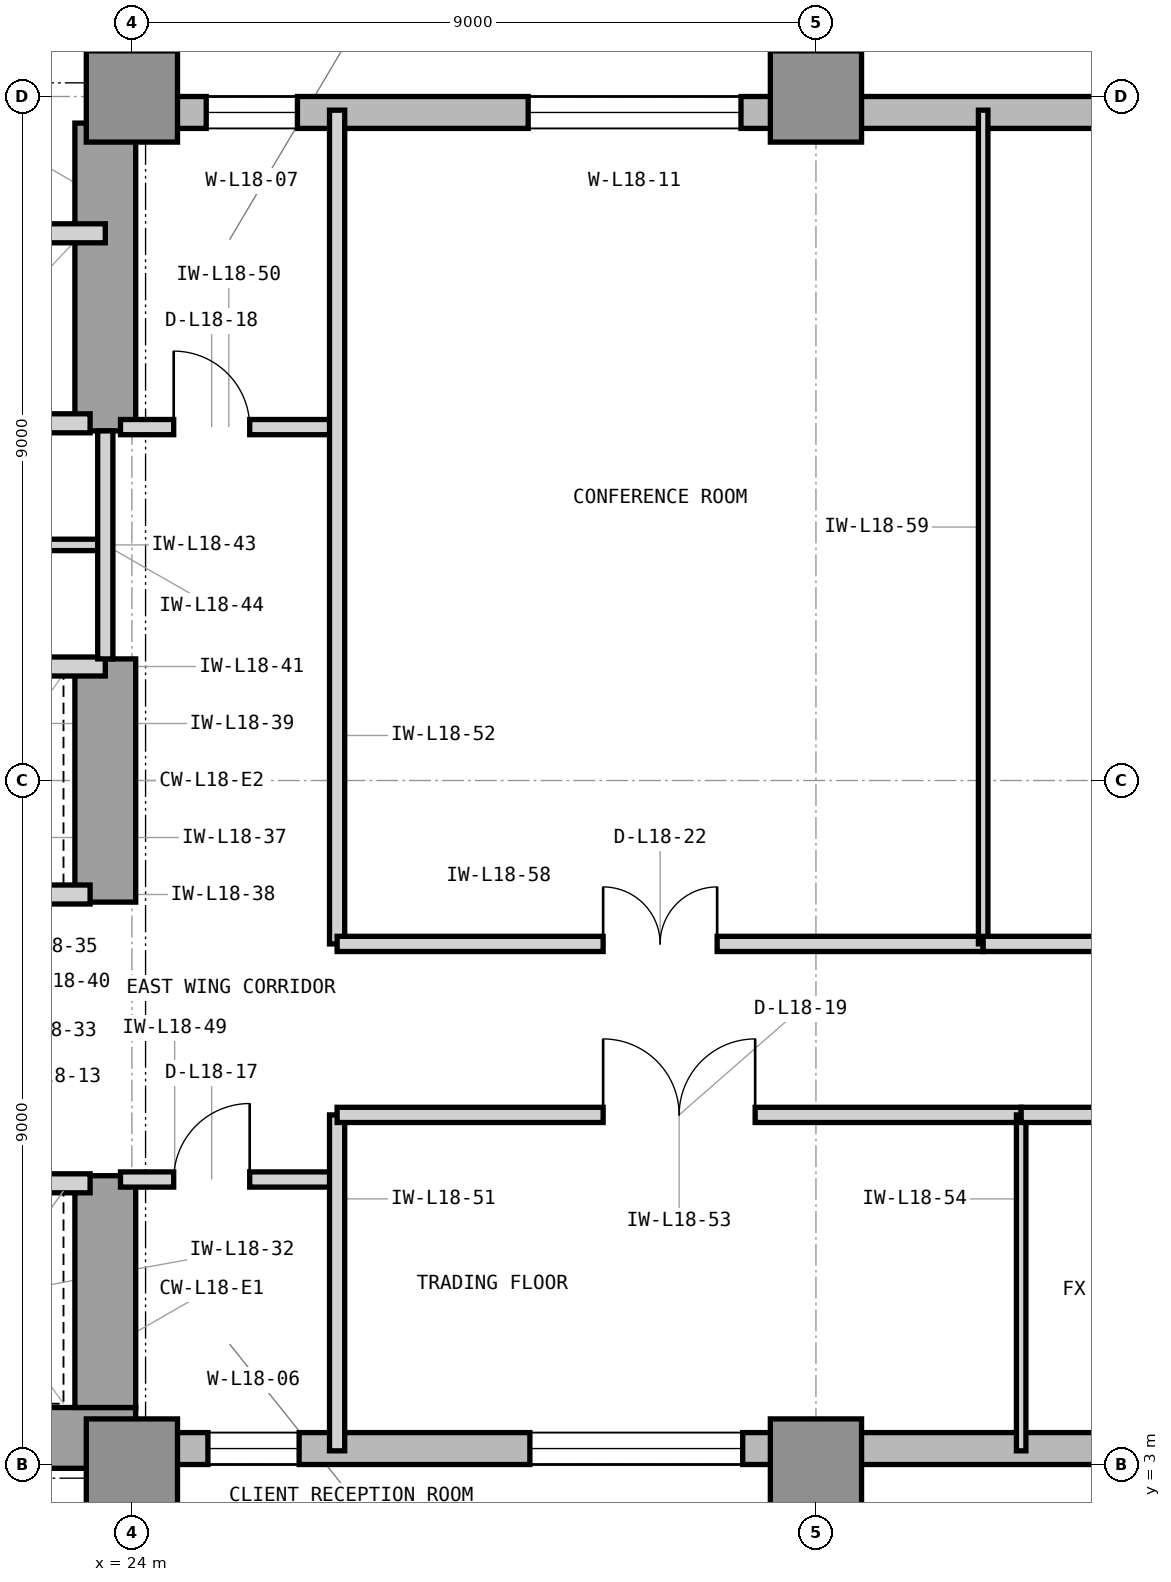
"""IFC4 building model, lengths in metres.
Left out: names, types, materials, properties, quantities, classifications, styles, units other than length and angle.
Written with IfcOpenShell. Run it as: python <this file> out.ifc"""

import sys

from ifc_helpers import new_model, si_unit, direction, frame, frame_2d, origin, origin_2d, place, context, subcontext, project, spatial, rectangle, extrude, element, fill, save


model = new_model("IFC4")
c1 = context("Model", 3, precision=1e-05, world=origin(), true_north=direction((0.0, 1.0)))
c2 = subcontext(c1, "Body", "Model", "MODEL_VIEW")
j1 = project(units=[si_unit("LENGTHUNIT", "METRE"), si_unit("PLANEANGLEUNIT", "RADIAN")], contexts=[c1])
p1 = place(None, origin())
s1 = spatial("IfcSite", under=j1, at=p1, CompositionType="ELEMENT")
p2 = place(p1, origin())
s2 = spatial("IfcBuilding", under=s1, at=p2, CompositionType="ELEMENT")
p3 = place(p2, frame((0.0, 0.0, 80.4)))
s3 = spatial("IfcBuildingStorey", under=s2, at=p3, CompositionType="ELEMENT", Elevation=80.4)
p4 = place(p3, frame((7.475, 3.35, 0.0), z_axis=(0.0, 0.0, 1.0), x_axis=(1.0, 0.0, 0.0)))
e1 = element("IfcWall", 1, at=p4, inside=s3, PredefinedType="SHEAR", context=c2, shape_type="SweptSolid", body=[
    extrude(rectangle(XDim=16.575, YDim=0.8, at=frame_2d((8.288, 0.0))), origin(), (0.0, 0.0, 1.0), 4.2),
])
p5 = place(p3, frame((23.65, 3.75, 0.0), z_axis=(0.0, 0.0, 1.0), x_axis=(0.0, 1.0, 0.0)))
e2 = element("IfcWall", 2, at=p5, inside=s3, PredefinedType="SHEAR", context=c2, shape_type="SweptSolid", body=[
    extrude(rectangle(XDim=3.05, YDim=0.8, at=frame_2d((1.525, 0.0))), origin(), (0.0, 0.0, 1.0), 4.2),
])
p6 = place(p3, frame((23.65, 10.4, 0.0), z_axis=(0.0, 0.0, 1.0), x_axis=(0.0, 1.0, 0.0)))
e3 = element("IfcWall", 3, at=p6, inside=s3, PredefinedType="SHEAR", context=c2, shape_type="SweptSolid", body=[
    extrude(rectangle(XDim=3.2, YDim=0.8, at=frame_2d((1.6, 0.0))), origin(), (0.0, 0.0, 1.0), 4.2),
])
p7 = place(p3, frame((23.65, 16.6, 0.0), z_axis=(0.0, 0.0, 1.0), x_axis=(0.0, 1.0, 0.0)))
e4 = element("IfcWall", 4, at=p7, inside=s3, PredefinedType="SHEAR", context=c2, shape_type="SweptSolid", body=[
    extrude(rectangle(XDim=4.05, YDim=0.8, at=frame_2d((2.025, 0.0))), origin(), (0.0, 0.0, 1.0), 4.2),
])
for number, where, z_axis, x_axis in (
    (5, (24.0, 3.0, 0.0), (0.0, 0.0, 1.0), (1.0, 0.0, 0.0)),
    (6, (24.0, 21.0, 0.0), (0.0, 0.0, 1.0), (1.0, 0.0, 0.0)),
    (7, (33.0, 3.0, 0.0), (0.0, 0.0, 1.0), (1.0, 0.0, 0.0)),
    (8, (33.0, 21.0, 0.0), (0.0, 0.0, 1.0), (1.0, 0.0, 0.0)),
):
    element("IfcColumn", number, at=place(p3, frame(where, z_axis=z_axis, x_axis=x_axis)), inside=s3, PredefinedType="COLUMN", context=c2, shape_type="SweptSolid", body=[
        extrude(rectangle(XDim=1.2, YDim=1.2, at=origin_2d()), origin(), (0.0, 0.0, 1.0), 4.2),
    ])
p8 = place(p3, frame((23.9, 3.21, 0.0), z_axis=(0.0, 0.0, 1.0), x_axis=(1.0, 0.0, 0.0)))
e9 = element("IfcWall", 9, at=p8, inside=s3, PredefinedType="STANDARD", context=c2, shape_type="SweptSolid", body=[
    extrude(rectangle(XDim=40.5, YDim=0.42, at=frame_2d((20.25, 0.0))), origin(), (0.0, 0.0, 1.0), 3.92),
])
p9 = place(p8, frame((1.1, 0.0, 0.85)))
e10 = element("IfcOpeningElement", 10, at=p9, cuts=e9, PredefinedType="OPENING", context=c2, shape_type="SweptSolid", body=[
    extrude(rectangle(XDim=1.2, YDim=2.45, at=frame_2d((0.6, 1.225))), frame((0.0, 0.22, 0.0), z_axis=(0.0, -1.0, 0.0), x_axis=(1.0, 0.0, 0.0)), (0.0, 0.0, 1.0), 0.44),
])
p10 = place(p8, frame((5.336, 0.0, 0.85)))
e11 = element("IfcOpeningElement", 11, at=p10, cuts=e9, PredefinedType="OPENING", context=c2, shape_type="SweptSolid", body=[
    extrude(rectangle(XDim=2.8, YDim=2.45, at=frame_2d((1.4, 1.225))), frame((0.0, 0.22, 0.0), z_axis=(0.0, -1.0, 0.0), x_axis=(1.0, 0.0, 0.0)), (0.0, 0.0, 1.0), 0.44),
])
p11 = place(p8, frame((14.136, 0.0, 0.85)))
e12 = element("IfcOpeningElement", 12, at=p11, cuts=e9, PredefinedType="OPENING", context=c2, shape_type="SweptSolid", body=[
    extrude(rectangle(XDim=2.8, YDim=2.45, at=frame_2d((1.4, 1.225))), frame((0.0, 0.22, 0.0), z_axis=(0.0, -1.0, 0.0), x_axis=(1.0, 0.0, 0.0)), (0.0, 0.0, 1.0), 0.44),
])
p12 = place(p8, frame((20.336, 0.0, 0.85)))
e13 = element("IfcOpeningElement", 13, at=p12, cuts=e9, PredefinedType="OPENING", context=c2, shape_type="SweptSolid", body=[
    extrude(rectangle(XDim=2.8, YDim=2.45, at=frame_2d((1.4, 1.225))), frame((0.0, 0.22, 0.0), z_axis=(0.0, -1.0, 0.0), x_axis=(1.0, 0.0, 0.0)), (0.0, 0.0, 1.0), 0.44),
])
p13 = place(p3, frame((64.4, 20.79, 0.0), z_axis=(0.0, 0.0, 1.0), x_axis=(-1.0, 0.0, 0.0)))
e14 = element("IfcWall", 14, at=p13, inside=s3, PredefinedType="STANDARD", context=c2, shape_type="SweptSolid", body=[
    extrude(rectangle(XDim=40.4, YDim=0.42, at=frame_2d((20.2, 0.0))), origin(), (0.0, 0.0, 1.0), 3.92),
])
p14 = place(p13, frame((38.222, 0.0, 0.85)))
e15 = element("IfcOpeningElement", 15, at=p14, cuts=e14, PredefinedType="OPENING", context=c2, shape_type="SweptSolid", body=[
    extrude(rectangle(XDim=1.2, YDim=2.45, at=frame_2d((0.6, 1.225))), frame((0.0, 0.22, 0.0), z_axis=(0.0, -1.0, 0.0), x_axis=(1.0, 0.0, 0.0)), (0.0, 0.0, 1.0), 0.44),
])
p15 = place(p13, frame((32.386, 0.0, 0.85)))
e16 = element("IfcOpeningElement", 16, at=p15, cuts=e14, PredefinedType="OPENING", context=c2, shape_type="SweptSolid", body=[
    extrude(rectangle(XDim=2.8, YDim=2.45, at=frame_2d((1.4, 1.225))), frame((0.0, 0.22, 0.0), z_axis=(0.0, -1.0, 0.0), x_axis=(1.0, 0.0, 0.0)), (0.0, 0.0, 1.0), 0.44),
])
p16 = place(p13, frame((23.386, 0.0, 0.85)))
e17 = element("IfcOpeningElement", 17, at=p16, cuts=e14, PredefinedType="OPENING", context=c2, shape_type="SweptSolid", body=[
    extrude(rectangle(XDim=2.8, YDim=2.45, at=frame_2d((1.4, 1.225))), frame((0.0, 0.22, 0.0), z_axis=(0.0, -1.0, 0.0), x_axis=(1.0, 0.0, 0.0)), (0.0, 0.0, 1.0), 0.44),
])
p17 = place(p13, frame((17.386, 0.0, 0.85)))
e18 = element("IfcOpeningElement", 18, at=p17, cuts=e14, PredefinedType="OPENING", context=c2, shape_type="SweptSolid", body=[
    extrude(rectangle(XDim=2.1, YDim=2.45, at=frame_2d((1.05, 1.225))), frame((0.0, 0.22, 0.0), z_axis=(0.0, -1.0, 0.0), x_axis=(1.0, 0.0, 0.0)), (0.0, 0.0, 1.0), 0.44),
])
p18 = place(p13, frame((8.436, 0.0, 0.85)))
e19 = element("IfcOpeningElement", 19, at=p18, cuts=e14, PredefinedType="OPENING", context=c2, shape_type="SweptSolid", body=[
    extrude(rectangle(XDim=1.2, YDim=2.45, at=frame_2d((0.6, 1.225))), frame((0.0, 0.22, 0.0), z_axis=(0.0, -1.0, 0.0), x_axis=(1.0, 0.0, 0.0)), (0.0, 0.0, 1.0), 0.44),
])
p19 = place(p3, frame((23.79, 21.0, 0.0), z_axis=(0.0, 0.0, 1.0), x_axis=(0.0, 1.0, 0.0)))
e20 = element("IfcWall", 20, at=p19, inside=s3, PredefinedType="STANDARD", context=c2, shape_type="SweptSolid", body=[
    extrude(rectangle(XDim=28.4, YDim=0.42, at=frame_2d((14.2, 0.0))), origin(), (0.0, 0.0, 1.0), 3.92),
])
p20 = place(p19, frame((10.433, 0.0, 0.85)))
e21 = element("IfcOpeningElement", 21, at=p20, cuts=e20, PredefinedType="OPENING", context=c2, shape_type="SweptSolid", body=[
    extrude(rectangle(XDim=2.8, YDim=2.45, at=frame_2d((1.4, 1.225))), frame((0.0, 0.22, 0.0), z_axis=(0.0, -1.0, 0.0), x_axis=(1.0, 0.0, 0.0)), (0.0, 0.0, 1.0), 0.44),
])
p21 = place(p19, frame((21.966, 0.0, 0.85)))
e22 = element("IfcOpeningElement", 22, at=p21, cuts=e20, PredefinedType="OPENING", context=c2, shape_type="SweptSolid", body=[
    extrude(rectangle(XDim=1.2, YDim=2.45, at=frame_2d((0.6, 1.225))), frame((0.0, 0.22, 0.0), z_axis=(0.0, -1.0, 0.0), x_axis=(1.0, 0.0, 0.0)), (0.0, 0.0, 1.0), 0.44),
])
p22 = place(p3, frame((21.05, 16.7, 0.0), z_axis=(0.0, 0.0, 1.0), x_axis=(1.0, 0.0, 0.0)))
e23 = element("IfcWall", 23, at=p22, inside=s3, PredefinedType="PARTITIONING", context=c2, shape_type="SweptSolid", body=[
    extrude(rectangle(XDim=2.4, YDim=0.25, at=frame_2d((1.2, 0.0))), origin(), (0.0, 0.0, 1.0), 3.293),
])
p23 = place(p3, frame((16.45, 19.2, 0.0), z_axis=(0.0, 0.0, 1.0), x_axis=(1.0, 0.0, 0.0)))
e24 = element("IfcWall", 24, at=p23, inside=s3, PredefinedType="PARTITIONING", context=c2, shape_type="SweptSolid", body=[
    extrude(rectangle(XDim=7.2, YDim=0.25, at=frame_2d((3.6, 0.0))), origin(), (0.0, 0.0, 1.0), 3.91),
])
p24 = place(p3, frame((21.05, 6.7, 0.0), z_axis=(0.0, 0.0, 1.0), x_axis=(1.0, 0.0, 0.0)))
e25 = element("IfcWall", 25, at=p24, inside=s3, PredefinedType="PARTITIONING", context=c2, shape_type="SweptSolid", body=[
    extrude(rectangle(XDim=2.4, YDim=0.25, at=frame_2d((1.2, 0.0))), origin(), (0.0, 0.0, 1.0), 3.293),
])
p25 = place(p24, frame((0.48, 0.0, 0.0)))
e26 = element("IfcOpeningElement", 26, at=p25, cuts=e25, PredefinedType="OPENING", context=c2, shape_type="SweptSolid", body=[
    extrude(rectangle(XDim=1.15, YDim=2.25, at=frame_2d((0.575, 1.125))), frame((0.0, 0.135, 0.0), z_axis=(0.0, -1.0, 0.0), x_axis=(1.0, 0.0, 0.0)), (0.0, 0.0, 1.0), 0.27),
])
p26 = place(p3, frame((21.05, 10.5, 0.0), z_axis=(0.0, 0.0, 1.0), x_axis=(1.0, 0.0, 0.0)))
e27 = element("IfcWall", 27, at=p26, inside=s3, PredefinedType="PARTITIONING", context=c2, shape_type="SweptSolid", body=[
    extrude(rectangle(XDim=2.4, YDim=0.25, at=frame_2d((1.2, 0.0))), origin(), (0.0, 0.0, 1.0), 3.293),
])
p27 = place(p3, frame((14.7, 13.5, 0.0), z_axis=(0.0, 0.0, 1.0), x_axis=(1.0, 0.0, 0.0)))
e28 = element("IfcWall", 28, at=p27, inside=s3, PredefinedType="PARTITIONING", context=c2, shape_type="SweptSolid", body=[
    extrude(rectangle(XDim=8.95, YDim=0.25, at=frame_2d((4.475, 0.0))), origin(), (0.0, 0.0, 1.0), 3.293),
])
p28 = place(p3, frame((18.45, 15.1, 0.0), z_axis=(0.0, 0.0, 1.0), x_axis=(1.0, 0.0, 0.0)))
e29 = element("IfcWall", 29, at=p28, inside=s3, PredefinedType="PARTITIONING", context=c2, shape_type="SweptSolid", body=[
    extrude(rectangle(XDim=5.2, YDim=0.15, at=frame_2d((2.6, 0.0))), origin(), (0.0, 0.0, 1.0), 3.91),
])
p29 = place(p3, frame((23.65, 13.6, 0.0), z_axis=(0.0, 0.0, 1.0), x_axis=(0.0, 1.0, 0.0)))
e30 = element("IfcWall", 30, at=p29, inside=s3, PredefinedType="PARTITIONING", context=c2, shape_type="SweptSolid", body=[
    extrude(rectangle(XDim=3.0, YDim=0.2, at=frame_2d((1.5, 0.0))), origin(), (0.0, 0.0, 1.0), 3.91),
])
p30 = place(p3, frame((23.85, 6.75, 0.0), z_axis=(0.0, 0.0, 1.0), x_axis=(1.0, 0.0, 0.0)))
e31 = element("IfcWall", 31, at=p30, inside=s3, PredefinedType="PARTITIONING", context=c2, shape_type="SweptSolid", body=[
    extrude(rectangle(XDim=2.85, YDim=0.2, at=frame_2d((1.425, 0.0))), origin(), (0.0, 0.0, 1.0), 3.91),
])
p31 = place(p30, frame((0.7, 0.0, 0.0)))
e32 = element("IfcOpeningElement", 32, at=p31, cuts=e31, PredefinedType="OPENING", context=c2, shape_type="SweptSolid", body=[
    extrude(rectangle(XDim=1.0, YDim=2.15, at=frame_2d((0.5, 1.075))), frame((0.0, 0.11, 0.0), z_axis=(0.0, -1.0, 0.0), x_axis=(1.0, 0.0, 0.0)), (0.0, 0.0, 1.0), 0.22),
])
p32 = place(p3, frame((23.85, 16.65, 0.0), z_axis=(0.0, 0.0, 1.0), x_axis=(1.0, 0.0, 0.0)))
e33 = element("IfcWall", 33, at=p32, inside=s3, PredefinedType="PARTITIONING", context=c2, shape_type="SweptSolid", body=[
    extrude(rectangle(XDim=2.85, YDim=0.2, at=frame_2d((1.425, 0.0))), origin(), (0.0, 0.0, 1.0), 3.91),
])
p33 = place(p32, frame((0.7, 0.0, 0.0)))
e34 = element("IfcOpeningElement", 34, at=p33, cuts=e33, PredefinedType="OPENING", context=c2, shape_type="SweptSolid", body=[
    extrude(rectangle(XDim=1.0, YDim=2.15, at=frame_2d((0.5, 1.075))), frame((0.0, 0.11, 0.0), z_axis=(0.0, -1.0, 0.0), x_axis=(1.0, 0.0, 0.0)), (0.0, 0.0, 1.0), 0.22),
])
p34 = place(p3, frame((26.7, 3.18, 0.0), z_axis=(0.0, 0.0, 1.0), x_axis=(0.0, 1.0, 0.0)))
e35 = element("IfcWall", 35, at=p34, inside=s3, PredefinedType="PARTITIONING", context=c2, shape_type="SweptSolid", body=[
    extrude(rectangle(XDim=4.42, YDim=0.2, at=frame_2d((2.21, 0.0))), origin(), (0.0, 0.0, 1.0), 3.91),
])
p35 = place(p3, frame((26.7, 9.85, 0.0), z_axis=(0.0, 0.0, 1.0), x_axis=(0.0, 1.0, 0.0)))
e36 = element("IfcWall", 36, at=p35, inside=s3, PredefinedType="PARTITIONING", context=c2, shape_type="SweptSolid", body=[
    extrude(rectangle(XDim=10.97, YDim=0.2, at=frame_2d((5.485, 0.0))), origin(), (0.0, 0.0, 1.0), 3.91),
])
p36 = place(p3, frame((26.7, 7.6, 0.0), z_axis=(0.0, 0.0, 1.0), x_axis=(1.0, 0.0, 0.0)))
e37 = element("IfcWall", 37, at=p36, inside=s3, PredefinedType="PARTITIONING", context=c2, shape_type="SweptSolid", body=[
    extrude(rectangle(XDim=9.0, YDim=0.2, at=frame_2d((4.5, 0.0))), origin(), (0.0, 0.0, 1.0), 3.91),
])
p37 = place(p36, frame((3.5, 0.0, 0.0)))
e38 = element("IfcOpeningElement", 38, at=p37, cuts=e37, PredefinedType="OPENING", context=c2, shape_type="SweptSolid", body=[
    extrude(rectangle(XDim=2.0, YDim=2.5, at=frame_2d((1.0, 1.25))), frame((0.0, 0.11, 0.0), z_axis=(0.0, -1.0, 0.0), x_axis=(1.0, 0.0, 0.0)), (0.0, 0.0, 1.0), 0.22),
])
p38 = place(p3, frame((35.7, 3.18, 0.0), z_axis=(0.0, 0.0, 1.0), x_axis=(0.0, 1.0, 0.0)))
e39 = element("IfcWall", 39, at=p38, inside=s3, PredefinedType="PARTITIONING", context=c2, shape_type="SweptSolid", body=[
    extrude(rectangle(XDim=4.42, YDim=0.125, at=frame_2d((2.21, 0.0))), origin(), (0.0, 0.0, 1.0), 3.91),
])
p39 = place(p3, frame((35.7, 7.6, 0.0), z_axis=(0.0, 0.0, 1.0), x_axis=(1.0, 0.0, 0.0)))
e40 = element("IfcWall", 40, at=p39, inside=s3, PredefinedType="PARTITIONING", context=c2, shape_type="SweptSolid", body=[
    extrude(rectangle(XDim=7.5, YDim=0.2, at=frame_2d((3.75, 0.0))), origin(), (0.0, 0.0, 1.0), 3.91),
])
p40 = place(p39, frame((3.25, 0.0, 0.0)))
e41 = element("IfcOpeningElement", 41, at=p40, cuts=e40, PredefinedType="OPENING", context=c2, shape_type="SweptSolid", body=[
    extrude(rectangle(XDim=1.0, YDim=2.15, at=frame_2d((0.5, 1.075))), frame((0.0, 0.11, 0.0), z_axis=(0.0, -1.0, 0.0), x_axis=(1.0, 0.0, 0.0)), (0.0, 0.0, 1.0), 0.22),
])
p41 = place(p3, frame((26.7, 9.85, 0.0), z_axis=(0.0, 0.0, 1.0), x_axis=(1.0, 0.0, 0.0)))
e42 = element("IfcWall", 42, at=p41, inside=s3, PredefinedType="PARTITIONING", context=c2, shape_type="SweptSolid", body=[
    extrude(rectangle(XDim=8.5, YDim=0.2, at=frame_2d((4.25, 0.0))), origin(), (0.0, 0.0, 1.0), 3.91),
])
p42 = place(p41, frame((3.5, 0.0, 0.0)))
e43 = element("IfcOpeningElement", 43, at=p42, cuts=e42, PredefinedType="OPENING", context=c2, shape_type="SweptSolid", body=[
    extrude(rectangle(XDim=1.5, YDim=2.3, at=frame_2d((0.75, 1.15))), frame((0.0, 0.11, 0.0), z_axis=(0.0, -1.0, 0.0), x_axis=(1.0, 0.0, 0.0)), (0.0, 0.0, 1.0), 0.22),
])
p43 = place(p3, frame((35.2, 9.85, 0.0), z_axis=(0.0, 0.0, 1.0), x_axis=(0.0, 1.0, 0.0)))
e44 = element("IfcWall", 44, at=p43, inside=s3, PredefinedType="PARTITIONING", context=c2, shape_type="SweptSolid", body=[
    extrude(rectangle(XDim=10.97, YDim=0.125, at=frame_2d((5.485, 0.0))), origin(), (0.0, 0.0, 1.0), 3.91),
])
p44 = place(p3, frame((35.2, 9.85, 0.0), z_axis=(0.0, 0.0, 1.0), x_axis=(1.0, 0.0, 0.0)))
e45 = element("IfcWall", 45, at=p44, inside=s3, PredefinedType="PARTITIONING", context=c2, shape_type="SweptSolid", body=[
    extrude(rectangle(XDim=9.0, YDim=0.2, at=frame_2d((4.5, 0.0))), origin(), (0.0, 0.0, 1.0), 3.91),
])
p45 = place(p44, frame((4.0, 0.0, 0.0)))
e46 = element("IfcOpeningElement", 46, at=p45, cuts=e45, PredefinedType="OPENING", context=c2, shape_type="SweptSolid", body=[
    extrude(rectangle(XDim=1.0, YDim=2.15, at=frame_2d((0.5, 1.075))), frame((0.0, 0.11, 0.0), z_axis=(0.0, -1.0, 0.0), x_axis=(1.0, 0.0, 0.0)), (0.0, 0.0, 1.0), 0.22),
])
p46 = place(p31, origin())
e47 = element("IfcDoor", 47, at=p46, inside=s3, OperationType="SINGLE_SWING_RIGHT", PredefinedType="DOOR", context=c2, shape_type="SweptSolid", body=[
    extrude(rectangle(XDim=1.0, YDim=2.15, at=frame_2d((0.5, 1.075))), frame((0.0, 0.025, 0.0), z_axis=(0.0, -1.0, 0.0), x_axis=(1.0, 0.0, 0.0)), (0.0, 0.0, 1.0), 0.05),
])
fill(e32, e47)
p47 = place(p33, origin())
e48 = element("IfcDoor", 48, at=p47, inside=s3, OperationType="SINGLE_SWING_LEFT", PredefinedType="DOOR", context=c2, shape_type="SweptSolid", body=[
    extrude(rectangle(XDim=1.0, YDim=2.15, at=frame_2d((0.5, 1.075))), frame((0.0, 0.025, 0.0), z_axis=(0.0, -1.0, 0.0), x_axis=(1.0, 0.0, 0.0)), (0.0, 0.0, 1.0), 0.05),
])
fill(e34, e48)
p48 = place(p37, origin())
e49 = element("IfcDoor", 49, at=p48, inside=s3, OperationType="DOUBLE_DOOR_SINGLE_SWING", PredefinedType="DOOR", context=c2, shape_type="SweptSolid", body=[
    extrude(rectangle(XDim=2.0, YDim=2.5, at=frame_2d((1.0, 1.25))), frame((0.0, 0.025, 0.0), z_axis=(0.0, -1.0, 0.0), x_axis=(1.0, 0.0, 0.0)), (0.0, 0.0, 1.0), 0.05),
])
fill(e38, e49)
p49 = place(p42, origin())
e50 = element("IfcDoor", 50, at=p49, inside=s3, OperationType="DOUBLE_DOOR_SINGLE_SWING", PredefinedType="DOOR", context=c2, shape_type="SweptSolid", body=[
    extrude(rectangle(XDim=1.5, YDim=2.3, at=frame_2d((0.75, 1.15))), frame((0.0, 0.025, 0.0), z_axis=(0.0, -1.0, 0.0), x_axis=(1.0, 0.0, 0.0)), (0.0, 0.0, 1.0), 0.05),
])
fill(e43, e50)
p50 = place(p9, origin())
e51 = element("IfcWindow", 51, at=p50, inside=s3, PartitioningType="SINGLE_PANEL", PredefinedType="WINDOW", context=c2, shape_type="SweptSolid", body=[
    extrude(rectangle(XDim=1.2, YDim=2.45, at=frame_2d((0.6, 1.225))), frame((0.0, 0.11, 0.0), z_axis=(0.0, -1.0, 0.0), x_axis=(1.0, 0.0, 0.0)), (0.0, 0.0, 1.0), 0.06),
])
fill(e10, e51)
p51 = place(p14, origin())
e52 = element("IfcWindow", 52, at=p51, inside=s3, PartitioningType="SINGLE_PANEL", PredefinedType="WINDOW", context=c2, shape_type="SweptSolid", body=[
    extrude(rectangle(XDim=1.2, YDim=2.45, at=frame_2d((0.6, 1.225))), frame((0.0, 0.11, 0.0), z_axis=(0.0, -1.0, 0.0), x_axis=(1.0, 0.0, 0.0)), (0.0, 0.0, 1.0), 0.06),
])
fill(e15, e52)
p52 = place(p10, origin())
e53 = element("IfcWindow", 53, at=p52, inside=s3, PartitioningType="SINGLE_PANEL", PredefinedType="WINDOW", context=c2, shape_type="SweptSolid", body=[
    extrude(rectangle(XDim=2.8, YDim=2.45, at=frame_2d((1.4, 1.225))), frame((0.0, 0.11, 0.0), z_axis=(0.0, -1.0, 0.0), x_axis=(1.0, 0.0, 0.0)), (0.0, 0.0, 1.0), 0.06),
])
fill(e11, e53)
p53 = place(p15, origin())
e54 = element("IfcWindow", 54, at=p53, inside=s3, PartitioningType="SINGLE_PANEL", PredefinedType="WINDOW", context=c2, shape_type="SweptSolid", body=[
    extrude(rectangle(XDim=2.8, YDim=2.45, at=frame_2d((1.4, 1.225))), frame((0.0, 0.11, 0.0), z_axis=(0.0, -1.0, 0.0), x_axis=(1.0, 0.0, 0.0)), (0.0, 0.0, 1.0), 0.06),
])
fill(e16, e54)
save(model, sys.argv[1])
